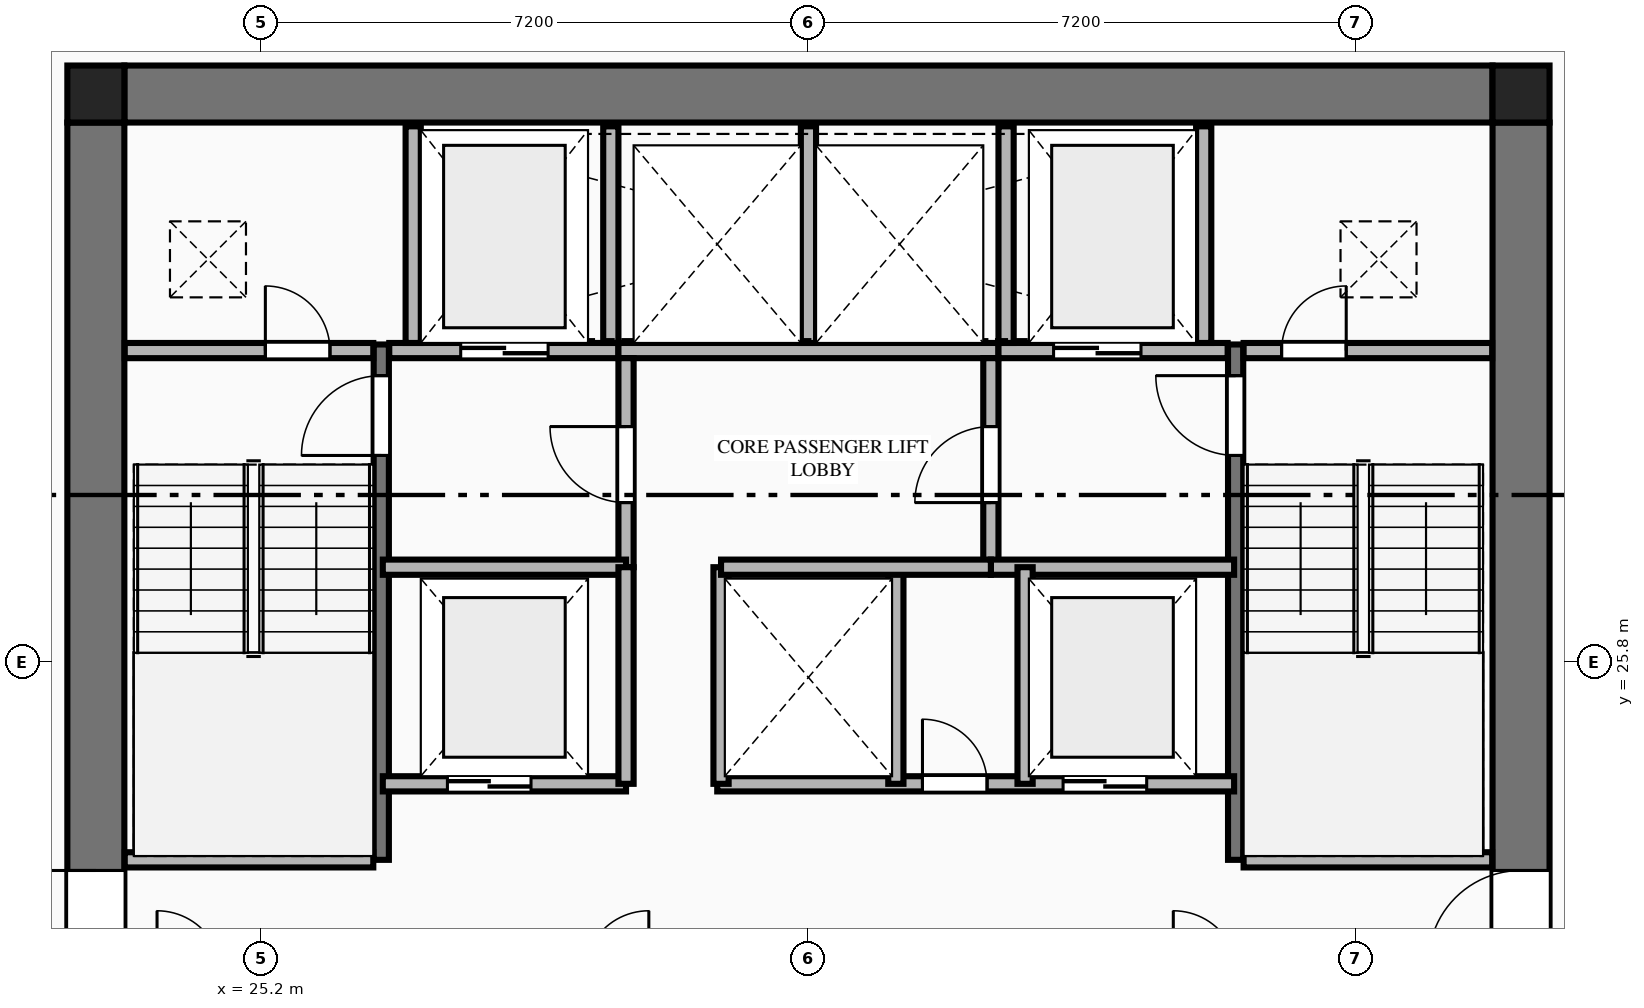
"""IFC4 building model, lengths in metres.
Left out: names, types, materials, properties, quantities, classifications, styles, units other than length and angle.
Written with IfcOpenShell. Run it as: python <this file> out.ifc"""

import sys

from ifc_helpers import new_model, si_unit, direction, frame, frame_2d, origin, origin_2d, place, context, subcontext, project, spatial, rectangle, extrude, element, fill, save


model = new_model("IFC4")
c1 = context("Model", 3, precision=1e-05, world=origin(), true_north=direction((0.0, 1.0)))
c2 = subcontext(c1, "Body", "Model", "MODEL_VIEW")
j1 = project(units=[si_unit("LENGTHUNIT", "METRE"), si_unit("PLANEANGLEUNIT", "RADIAN")], contexts=[c1])
p1 = place(None, origin())
s1 = spatial("IfcSite", under=j1, at=p1, CompositionType="ELEMENT")
p2 = place(p1, origin())
s2 = spatial("IfcBuilding", under=s1, at=p2, CompositionType="ELEMENT")
p3 = place(p2, frame((0.0, 0.0, 137.45)))
s3 = spatial("IfcBuildingStorey", under=s2, at=p3, CompositionType="ELEMENT", Elevation=137.45)
for number, where, z_axis, x_axis in (
    (1, (41.775, 33.275, 0.0), (0.0, 0.0, 1.0), (1.0, 0.0, 0.0)),
    (2, (23.025, 33.275, 0.0), (0.0, 0.0, 1.0), (1.0, 0.0, 0.0)),
):
    element("IfcColumn", number, at=place(p3, frame(where, z_axis=z_axis, x_axis=x_axis)), inside=s3, PredefinedType="COLUMN", context=c2, shape_type="SweptSolid", body=[
        extrude(rectangle(XDim=0.75, YDim=0.75, at=origin_2d()), origin(), (0.0, 0.0, 1.0), 3.55),
    ])
p4 = place(p3, frame((23.4, 33.275, 0.0), z_axis=(0.0, 0.0, 1.0), x_axis=(1.0, 0.0, 0.0)))
e3 = element("IfcWall", 3, at=p4, inside=s3, PredefinedType="SHEAR", context=c2, shape_type="SweptSolid", body=[
    extrude(rectangle(XDim=18.0, YDim=0.75, at=frame_2d((9.0, 0.0))), origin(), (0.0, 0.0, 1.0), 3.34),
])
p5 = place(p3, frame((23.025, 18.9, 0.0), z_axis=(0.0, 0.0, 1.0), x_axis=(0.0, 1.0, 0.0)))
e4 = element("IfcWall", 4, at=p5, inside=s3, PredefinedType="SHEAR", context=c2, shape_type="SweptSolid", body=[
    extrude(rectangle(XDim=14.0, YDim=0.75, at=frame_2d((7.0, 0.0))), origin(), (0.0, 0.0, 1.0), 3.34),
])
p6 = place(p5, frame((2.94, 0.0, 0.0)))
e5 = element("IfcOpeningElement", 5, at=p6, cuts=e4, PredefinedType="OPENING", context=c2, shape_type="SweptSolid", body=[
    extrude(rectangle(XDim=1.22, YDim=2.25, at=frame_2d((0.61, 1.125))), frame((0.0, 0.385, 0.0), z_axis=(0.0, -1.0, 0.0), x_axis=(1.0, 0.0, 0.0)), (0.0, 0.0, 1.0), 0.77),
])
p7 = place(p3, frame((41.775, 18.9, 0.0), z_axis=(0.0, 0.0, 1.0), x_axis=(0.0, 1.0, 0.0)))
e6 = element("IfcWall", 6, at=p7, inside=s3, PredefinedType="SHEAR", context=c2, shape_type="SweptSolid", body=[
    extrude(rectangle(XDim=14.0, YDim=0.75, at=frame_2d((7.0, 0.0))), origin(), (0.0, 0.0, 1.0), 3.34),
])
p8 = place(p7, frame((2.94, 0.0, 0.0)))
e7 = element("IfcOpeningElement", 7, at=p8, cuts=e6, PredefinedType="OPENING", context=c2, shape_type="SweptSolid", body=[
    extrude(rectangle(XDim=1.22, YDim=2.25, at=frame_2d((0.61, 1.125))), frame((0.0, 0.385, 0.0), z_axis=(0.0, -1.0, 0.0), x_axis=(1.0, 0.0, 0.0)), (0.0, 0.0, 1.0), 0.77),
])
p9 = place(p3, frame((26.78, 23.2, 0.0), z_axis=(0.0, 0.0, 1.0), x_axis=(0.0, 1.0, 0.0)))
e8 = element("IfcWall", 8, at=p9, inside=s3, PredefinedType="SHEAR", context=c2, shape_type="SweptSolid", body=[
    extrude(rectangle(XDim=6.78, YDim=0.2, at=frame_2d((3.39, 0.0))), origin(), (0.0, 0.0, 1.0), 3.55),
])
p10 = place(p9, frame((5.32, 0.0, 0.0)))
e9 = element("IfcOpeningElement", 9, at=p10, cuts=e8, PredefinedType="OPENING", context=c2, shape_type="SweptSolid", body=[
    extrude(rectangle(XDim=1.05, YDim=2.15, at=frame_2d((0.525, 1.075))), frame((0.0, 0.11, 0.0), z_axis=(0.0, -1.0, 0.0), x_axis=(1.0, 0.0, 0.0)), (0.0, 0.0, 1.0), 0.22),
])
p11 = place(p3, frame((23.405, 23.2, 0.0), z_axis=(0.0, 0.0, 1.0), x_axis=(1.0, 0.0, 0.0)))
e10 = element("IfcWall", 10, at=p11, inside=s3, PredefinedType="PLUMBINGWALL", context=c2, shape_type="SweptSolid", body=[
    extrude(rectangle(XDim=3.27, YDim=0.2, at=frame_2d((1.635, 0.0))), origin(), (0.0, 0.0, 1.0), 3.34),
])
p12 = place(p3, frame((38.02, 23.2, 0.0), z_axis=(0.0, 0.0, 1.0), x_axis=(0.0, 1.0, 0.0)))
e11 = element("IfcWall", 11, at=p12, inside=s3, PredefinedType="SHEAR", context=c2, shape_type="SweptSolid", body=[
    extrude(rectangle(XDim=6.78, YDim=0.2, at=frame_2d((3.39, 0.0))), origin(), (0.0, 0.0, 1.0), 3.55),
])
p13 = place(p12, frame((5.32, 0.0, 0.0)))
e12 = element("IfcOpeningElement", 12, at=p13, cuts=e11, PredefinedType="OPENING", context=c2, shape_type="SweptSolid", body=[
    extrude(rectangle(XDim=1.05, YDim=2.15, at=frame_2d((0.525, 1.075))), frame((0.0, 0.11, 0.0), z_axis=(0.0, -1.0, 0.0), x_axis=(1.0, 0.0, 0.0)), (0.0, 0.0, 1.0), 0.22),
])
p14 = place(p3, frame((38.125, 23.2, 0.0), z_axis=(0.0, 0.0, 1.0), x_axis=(1.0, 0.0, 0.0)))
e13 = element("IfcWall", 13, at=p14, inside=s3, PredefinedType="PLUMBINGWALL", context=c2, shape_type="SweptSolid", body=[
    extrude(rectangle(XDim=3.27, YDim=0.2, at=frame_2d((1.635, 0.0))), origin(), (0.0, 0.0, 1.0), 3.34),
])
p15 = place(p3, frame((23.405, 29.9, 0.0), z_axis=(0.0, 0.0, 1.0), x_axis=(1.0, 0.0, 0.0)))
e14 = element("IfcWall", 14, at=p15, inside=s3, PredefinedType="PLUMBINGWALL", context=c2, shape_type="SweptSolid", body=[
    extrude(rectangle(XDim=3.27, YDim=0.2, at=frame_2d((1.635, 0.0))), origin(), (0.0, 0.0, 1.0), 3.34),
])
p16 = place(p15, frame((1.85, 0.0, 0.0)))
e15 = element("IfcOpeningElement", 15, at=p16, cuts=e14, PredefinedType="OPENING", context=c2, shape_type="SweptSolid", body=[
    extrude(rectangle(XDim=0.85, YDim=2.05, at=frame_2d((0.425, 1.025))), frame((0.0, 0.11, 0.0), z_axis=(0.0, -1.0, 0.0), x_axis=(1.0, 0.0, 0.0)), (0.0, 0.0, 1.0), 0.22),
])
p17 = place(p3, frame((26.885, 29.9, 0.0), z_axis=(0.0, 0.0, 1.0), x_axis=(1.0, 0.0, 0.0)))
e16 = element("IfcWall", 16, at=p17, inside=s3, PredefinedType="PLUMBINGWALL", context=c2, shape_type="SweptSolid", body=[
    extrude(rectangle(XDim=3.015, YDim=0.2, at=frame_2d((1.507, 0.0))), origin(), (0.0, 0.0, 1.0), 3.34),
])
p18 = place(p17, frame((0.94, 0.0, 0.0)))
e17 = element("IfcOpeningElement", 17, at=p18, cuts=e16, PredefinedType="OPENING", context=c2, shape_type="SweptSolid", body=[
    extrude(rectangle(XDim=1.15, YDim=2.2, at=frame_2d((0.575, 1.1))), frame((0.0, 0.11, 0.0), z_axis=(0.0, -1.0, 0.0), x_axis=(1.0, 0.0, 0.0)), (0.0, 0.0, 1.0), 0.22),
])
p19 = place(p3, frame((29.9, 29.9, 0.0), z_axis=(0.0, 0.0, 1.0), x_axis=(1.0, 0.0, 0.0)))
e18 = element("IfcWall", 18, at=p19, inside=s3, PredefinedType="PLUMBINGWALL", context=c2, shape_type="SweptSolid", body=[
    extrude(rectangle(XDim=5.0, YDim=0.2, at=frame_2d((2.5, 0.0))), origin(), (0.0, 0.0, 1.0), 3.34),
])
p20 = place(p3, frame((34.9, 29.9, 0.0), z_axis=(0.0, 0.0, 1.0), x_axis=(1.0, 0.0, 0.0)))
e19 = element("IfcWall", 19, at=p20, inside=s3, PredefinedType="PLUMBINGWALL", context=c2, shape_type="SweptSolid", body=[
    extrude(rectangle(XDim=3.015, YDim=0.2, at=frame_2d((1.508, 0.0))), origin(), (0.0, 0.0, 1.0), 3.34),
])
p21 = place(p20, frame((0.725, 0.0, 0.0)))
e20 = element("IfcOpeningElement", 20, at=p21, cuts=e19, PredefinedType="OPENING", context=c2, shape_type="SweptSolid", body=[
    extrude(rectangle(XDim=1.15, YDim=2.2, at=frame_2d((0.575, 1.1))), frame((0.0, 0.11, 0.0), z_axis=(0.0, -1.0, 0.0), x_axis=(1.0, 0.0, 0.0)), (0.0, 0.0, 1.0), 0.22),
])
p22 = place(p3, frame((38.125, 29.9, 0.0), z_axis=(0.0, 0.0, 1.0), x_axis=(1.0, 0.0, 0.0)))
e21 = element("IfcWall", 21, at=p22, inside=s3, PredefinedType="PLUMBINGWALL", context=c2, shape_type="SweptSolid", body=[
    extrude(rectangle(XDim=3.27, YDim=0.2, at=frame_2d((1.635, 0.0))), origin(), (0.0, 0.0, 1.0), 3.34),
])
p23 = place(p22, frame((0.5, 0.0, 0.0)))
e22 = element("IfcOpeningElement", 22, at=p23, cuts=e21, PredefinedType="OPENING", context=c2, shape_type="SweptSolid", body=[
    extrude(rectangle(XDim=0.85, YDim=2.05, at=frame_2d((0.425, 1.025))), frame((0.0, 0.11, 0.0), z_axis=(0.0, -1.0, 0.0), x_axis=(1.0, 0.0, 0.0)), (0.0, 0.0, 1.0), 0.22),
])
for number, where, z_axis, x_axis in (
    (23, (27.2, 30.0, 0.0), (0.0, 0.0, 1.0), (0.0, 1.0, 0.0)),
    (24, (29.8, 30.0, 0.0), (0.0, 0.0, 1.0), (0.0, 1.0, 0.0)),
    (25, (32.4, 30.0, 0.0), (0.0, 0.0, 1.0), (0.0, 1.0, 0.0)),
    (26, (35.0, 30.0, 0.0), (0.0, 0.0, 1.0), (0.0, 1.0, 0.0)),
    (27, (37.6, 30.0, 0.0), (0.0, 0.0, 1.0), (0.0, 1.0, 0.0)),
):
    element("IfcWall", number, at=place(p3, frame(where, z_axis=z_axis, x_axis=x_axis)), inside=s3, PredefinedType="PLUMBINGWALL", context=c2, shape_type="SweptSolid", body=[
        extrude(rectangle(XDim=2.85, YDim=0.2, at=frame_2d((1.425, 0.0))), origin(), (0.0, 0.0, 1.0), 3.34),
    ])
p24 = place(p3, frame((30.0, 27.05, 0.0), z_axis=(0.0, 0.0, 1.0), x_axis=(0.0, 1.0, 0.0)))
e28 = element("IfcWall", 28, at=p24, inside=s3, PredefinedType="PLUMBINGWALL", context=c2, shape_type="SweptSolid", body=[
    extrude(rectangle(XDim=2.75, YDim=0.2, at=frame_2d((1.375, 0.0))), origin(), (0.0, 0.0, 1.0), 3.34),
])
p25 = place(p24, frame((0.85, 0.0, 0.0)))
e29 = element("IfcOpeningElement", 29, at=p25, cuts=e28, PredefinedType="OPENING", context=c2, shape_type="SweptSolid", body=[
    extrude(rectangle(XDim=1.0, YDim=2.15, at=frame_2d((0.5, 1.075))), frame((0.0, 0.11, 0.0), z_axis=(0.0, -1.0, 0.0), x_axis=(1.0, 0.0, 0.0)), (0.0, 0.0, 1.0), 0.22),
])
p26 = place(p3, frame((26.8, 27.05, 0.0), z_axis=(0.0, 0.0, 1.0), x_axis=(1.0, 0.0, 0.0)))
e30 = element("IfcWall", 30, at=p26, inside=s3, PredefinedType="PLUMBINGWALL", context=c2, shape_type="SweptSolid", body=[
    extrude(rectangle(XDim=3.2, YDim=0.2, at=frame_2d((1.6, 0.0))), origin(), (0.0, 0.0, 1.0), 3.34),
])
p27 = place(p3, frame((34.8, 27.05, 0.0), z_axis=(0.0, 0.0, 1.0), x_axis=(0.0, 1.0, 0.0)))
e31 = element("IfcWall", 31, at=p27, inside=s3, PredefinedType="PLUMBINGWALL", context=c2, shape_type="SweptSolid", body=[
    extrude(rectangle(XDim=2.75, YDim=0.2, at=frame_2d((1.375, 0.0))), origin(), (0.0, 0.0, 1.0), 3.34),
])
p28 = place(p27, frame((0.85, 0.0, 0.0)))
e32 = element("IfcOpeningElement", 32, at=p28, cuts=e31, PredefinedType="OPENING", context=c2, shape_type="SweptSolid", body=[
    extrude(rectangle(XDim=1.0, YDim=2.15, at=frame_2d((0.5, 1.075))), frame((0.0, 0.11, 0.0), z_axis=(0.0, -1.0, 0.0), x_axis=(1.0, 0.0, 0.0)), (0.0, 0.0, 1.0), 0.22),
])
p29 = place(p3, frame((34.8, 27.05, 0.0), z_axis=(0.0, 0.0, 1.0), x_axis=(1.0, 0.0, 0.0)))
e33 = element("IfcWall", 33, at=p29, inside=s3, PredefinedType="PLUMBINGWALL", context=c2, shape_type="SweptSolid", body=[
    extrude(rectangle(XDim=3.2, YDim=0.2, at=frame_2d((1.6, 0.0))), origin(), (0.0, 0.0, 1.0), 3.34),
])
p30 = place(p3, frame((26.8, 24.2, 0.0), z_axis=(0.0, 0.0, 1.0), x_axis=(1.0, 0.0, 0.0)))
e34 = element("IfcWall", 34, at=p30, inside=s3, PredefinedType="PLUMBINGWALL", context=c2, shape_type="SweptSolid", body=[
    extrude(rectangle(XDim=3.2, YDim=0.2, at=frame_2d((1.6, 0.0))), origin(), (0.0, 0.0, 1.0), 3.34),
])
p31 = place(p30, frame((0.85, 0.0, 0.0)))
e35 = element("IfcOpeningElement", 35, at=p31, cuts=e34, PredefinedType="OPENING", context=c2, shape_type="SweptSolid", body=[
    extrude(rectangle(XDim=1.1, YDim=2.2, at=frame_2d((0.55, 1.1))), frame((0.0, 0.11, 0.0), z_axis=(0.0, -1.0, 0.0), x_axis=(1.0, 0.0, 0.0)), (0.0, 0.0, 1.0), 0.22),
])
p32 = place(p3, frame((30.0, 24.2, 0.0), z_axis=(0.0, 0.0, 1.0), x_axis=(0.0, 1.0, 0.0)))
e36 = element("IfcWall", 36, at=p32, inside=s3, PredefinedType="PLUMBINGWALL", context=c2, shape_type="SweptSolid", body=[
    extrude(rectangle(XDim=2.85, YDim=0.2, at=frame_2d((1.425, 0.0))), origin(), (0.0, 0.0, 1.0), 3.34),
])
p33 = place(p3, frame((31.2, 24.2, 0.0), z_axis=(0.0, 0.0, 1.0), x_axis=(1.0, 0.0, 0.0)))
e37 = element("IfcWall", 37, at=p33, inside=s3, PredefinedType="PLUMBINGWALL", context=c2, shape_type="SweptSolid", body=[
    extrude(rectangle(XDim=6.8, YDim=0.2, at=frame_2d((3.4, 0.0))), origin(), (0.0, 0.0, 1.0), 3.34),
])
p34 = place(p33, frame((2.7, 0.0, 0.0)))
e38 = element("IfcOpeningElement", 38, at=p34, cuts=e37, PredefinedType="OPENING", context=c2, shape_type="SweptSolid", body=[
    extrude(rectangle(XDim=0.85, YDim=2.05, at=frame_2d((0.425, 1.025))), frame((0.0, 0.11, 0.0), z_axis=(0.0, -1.0, 0.0), x_axis=(1.0, 0.0, 0.0)), (0.0, 0.0, 1.0), 0.22),
])
p35 = place(p33, frame((4.55, 0.0, 0.0)))
e39 = element("IfcOpeningElement", 39, at=p35, cuts=e37, PredefinedType="OPENING", context=c2, shape_type="SweptSolid", body=[
    extrude(rectangle(XDim=1.1, YDim=2.2, at=frame_2d((0.55, 1.1))), frame((0.0, 0.11, 0.0), z_axis=(0.0, -1.0, 0.0), x_axis=(1.0, 0.0, 0.0)), (0.0, 0.0, 1.0), 0.22),
])
for number, where, z_axis, x_axis in (
    (40, (31.25, 24.2, 0.0), (0.0, 0.0, 1.0), (0.0, 1.0, 0.0)),
    (41, (33.55, 24.2, 0.0), (0.0, 0.0, 1.0), (0.0, 1.0, 0.0)),
    (42, (35.25, 24.2, 0.0), (0.0, 0.0, 1.0), (0.0, 1.0, 0.0)),
):
    element("IfcWall", number, at=place(p3, frame(where, z_axis=z_axis, x_axis=x_axis)), inside=s3, PredefinedType="PLUMBINGWALL", context=c2, shape_type="SweptSolid", body=[
        extrude(rectangle(XDim=2.85, YDim=0.2, at=frame_2d((1.425, 0.0))), origin(), (0.0, 0.0, 1.0), 3.34),
    ])
p36 = place(p3, frame((31.25, 27.05, 0.0), z_axis=(0.0, 0.0, 1.0), x_axis=(1.0, 0.0, 0.0)))
e43 = element("IfcWall", 43, at=p36, inside=s3, PredefinedType="PLUMBINGWALL", context=c2, shape_type="SweptSolid", body=[
    extrude(rectangle(XDim=3.55, YDim=0.2, at=frame_2d((1.775, 0.0))), origin(), (0.0, 0.0, 1.0), 3.34),
])
p37 = place(p6, origin())
e44 = element("IfcDoor", 44, at=p37, inside=s3, OperationType="SINGLE_SWING_RIGHT", PredefinedType="DOOR", context=c2, shape_type="SweptSolid", body=[
    extrude(rectangle(XDim=1.22, YDim=2.25, at=frame_2d((0.61, 1.125))), frame((0.0, 0.025, 0.0), z_axis=(0.0, -1.0, 0.0), x_axis=(1.0, 0.0, 0.0)), (0.0, 0.0, 1.0), 0.05),
])
fill(e5, e44)
p38 = place(p8, origin())
e45 = element("IfcDoor", 45, at=p38, inside=s3, OperationType="SINGLE_SWING_LEFT", PredefinedType="DOOR", context=c2, shape_type="SweptSolid", body=[
    extrude(rectangle(XDim=1.22, YDim=2.25, at=frame_2d((0.61, 1.125))), frame((0.0, 0.025, 0.0), z_axis=(0.0, -1.0, 0.0), x_axis=(1.0, 0.0, 0.0)), (0.0, 0.0, 1.0), 0.05),
])
fill(e7, e45)
p39 = place(p10, origin())
e46 = element("IfcDoor", 46, at=p39, inside=s3, OperationType="SINGLE_SWING_LEFT", PredefinedType="DOOR", context=c2, shape_type="SweptSolid", body=[
    extrude(rectangle(XDim=1.05, YDim=2.15, at=frame_2d((0.525, 1.075))), frame((0.0, 0.025, 0.0), z_axis=(0.0, -1.0, 0.0), x_axis=(1.0, 0.0, 0.0)), (0.0, 0.0, 1.0), 0.05),
])
fill(e9, e46)
p40 = place(p13, origin())
e47 = element("IfcDoor", 47, at=p40, inside=s3, OperationType="SINGLE_SWING_RIGHT", PredefinedType="DOOR", context=c2, shape_type="SweptSolid", body=[
    extrude(rectangle(XDim=1.05, YDim=2.15, at=frame_2d((0.525, 1.075))), frame((0.0, 0.025, 0.0), z_axis=(0.0, -1.0, 0.0), x_axis=(1.0, 0.0, 0.0)), (0.0, 0.0, 1.0), 0.05),
])
fill(e12, e47)
p41 = place(p16, origin())
e48 = element("IfcDoor", 48, at=p41, inside=s3, OperationType="SINGLE_SWING_LEFT", PredefinedType="DOOR", context=c2, shape_type="SweptSolid", body=[
    extrude(rectangle(XDim=0.85, YDim=2.05, at=frame_2d((0.425, 1.025))), frame((0.0, 0.025, 0.0), z_axis=(0.0, -1.0, 0.0), x_axis=(1.0, 0.0, 0.0)), (0.0, 0.0, 1.0), 0.05),
])
fill(e15, e48)
p42 = place(p23, origin())
e49 = element("IfcDoor", 49, at=p42, inside=s3, OperationType="SINGLE_SWING_RIGHT", PredefinedType="DOOR", context=c2, shape_type="SweptSolid", body=[
    extrude(rectangle(XDim=0.85, YDim=2.05, at=frame_2d((0.425, 1.025))), frame((0.0, 0.025, 0.0), z_axis=(0.0, -1.0, 0.0), x_axis=(1.0, 0.0, 0.0)), (0.0, 0.0, 1.0), 0.05),
])
fill(e22, e49)
p43 = place(p18, origin())
e50 = element("IfcDoor", 50, at=p43, inside=s3, OperationType="DOUBLE_DOOR_SLIDING", PredefinedType="DOOR", context=c2, shape_type="SweptSolid", body=[
    extrude(rectangle(XDim=1.15, YDim=2.2, at=frame_2d((0.575, 1.1))), frame((0.0, 0.025, 0.0), z_axis=(0.0, -1.0, 0.0), x_axis=(1.0, 0.0, 0.0)), (0.0, 0.0, 1.0), 0.05),
])
fill(e17, e50)
p44 = place(p21, origin())
e51 = element("IfcDoor", 51, at=p44, inside=s3, OperationType="DOUBLE_DOOR_SLIDING", PredefinedType="DOOR", context=c2, shape_type="SweptSolid", body=[
    extrude(rectangle(XDim=1.15, YDim=2.2, at=frame_2d((0.575, 1.1))), frame((0.0, 0.025, 0.0), z_axis=(0.0, -1.0, 0.0), x_axis=(1.0, 0.0, 0.0)), (0.0, 0.0, 1.0), 0.05),
])
fill(e20, e51)
p45 = place(p25, origin())
e52 = element("IfcDoor", 52, at=p45, inside=s3, OperationType="SINGLE_SWING_RIGHT", PredefinedType="DOOR", context=c2, shape_type="SweptSolid", body=[
    extrude(rectangle(XDim=1.0, YDim=2.15, at=frame_2d((0.5, 1.075))), frame((0.0, 0.025, 0.0), z_axis=(0.0, -1.0, 0.0), x_axis=(1.0, 0.0, 0.0)), (0.0, 0.0, 1.0), 0.05),
])
fill(e29, e52)
p46 = place(p28, origin())
e53 = element("IfcDoor", 53, at=p46, inside=s3, OperationType="SINGLE_SWING_LEFT", PredefinedType="DOOR", context=c2, shape_type="SweptSolid", body=[
    extrude(rectangle(XDim=1.0, YDim=2.15, at=frame_2d((0.5, 1.075))), frame((0.0, 0.025, 0.0), z_axis=(0.0, -1.0, 0.0), x_axis=(1.0, 0.0, 0.0)), (0.0, 0.0, 1.0), 0.05),
])
fill(e32, e53)
p47 = place(p31, origin())
e54 = element("IfcDoor", 54, at=p47, inside=s3, OperationType="DOUBLE_DOOR_SLIDING", PredefinedType="DOOR", context=c2, shape_type="SweptSolid", body=[
    extrude(rectangle(XDim=1.1, YDim=2.2, at=frame_2d((0.55, 1.1))), frame((0.0, 0.025, 0.0), z_axis=(0.0, -1.0, 0.0), x_axis=(1.0, 0.0, 0.0)), (0.0, 0.0, 1.0), 0.05),
])
fill(e35, e54)
p48 = place(p34, origin())
e55 = element("IfcDoor", 55, at=p48, inside=s3, OperationType="SINGLE_SWING_LEFT", PredefinedType="DOOR", context=c2, shape_type="SweptSolid", body=[
    extrude(rectangle(XDim=0.85, YDim=2.05, at=frame_2d((0.425, 1.025))), frame((0.0, 0.025, 0.0), z_axis=(0.0, -1.0, 0.0), x_axis=(1.0, 0.0, 0.0)), (0.0, 0.0, 1.0), 0.05),
])
fill(e38, e55)
p49 = place(p35, origin())
e56 = element("IfcDoor", 56, at=p49, inside=s3, OperationType="DOUBLE_DOOR_SLIDING", PredefinedType="DOOR", context=c2, shape_type="SweptSolid", body=[
    extrude(rectangle(XDim=1.1, YDim=2.2, at=frame_2d((0.55, 1.1))), frame((0.0, 0.025, 0.0), z_axis=(0.0, -1.0, 0.0), x_axis=(1.0, 0.0, 0.0)), (0.0, 0.0, 1.0), 0.05),
])
fill(e39, e56)
save(model, sys.argv[1])
